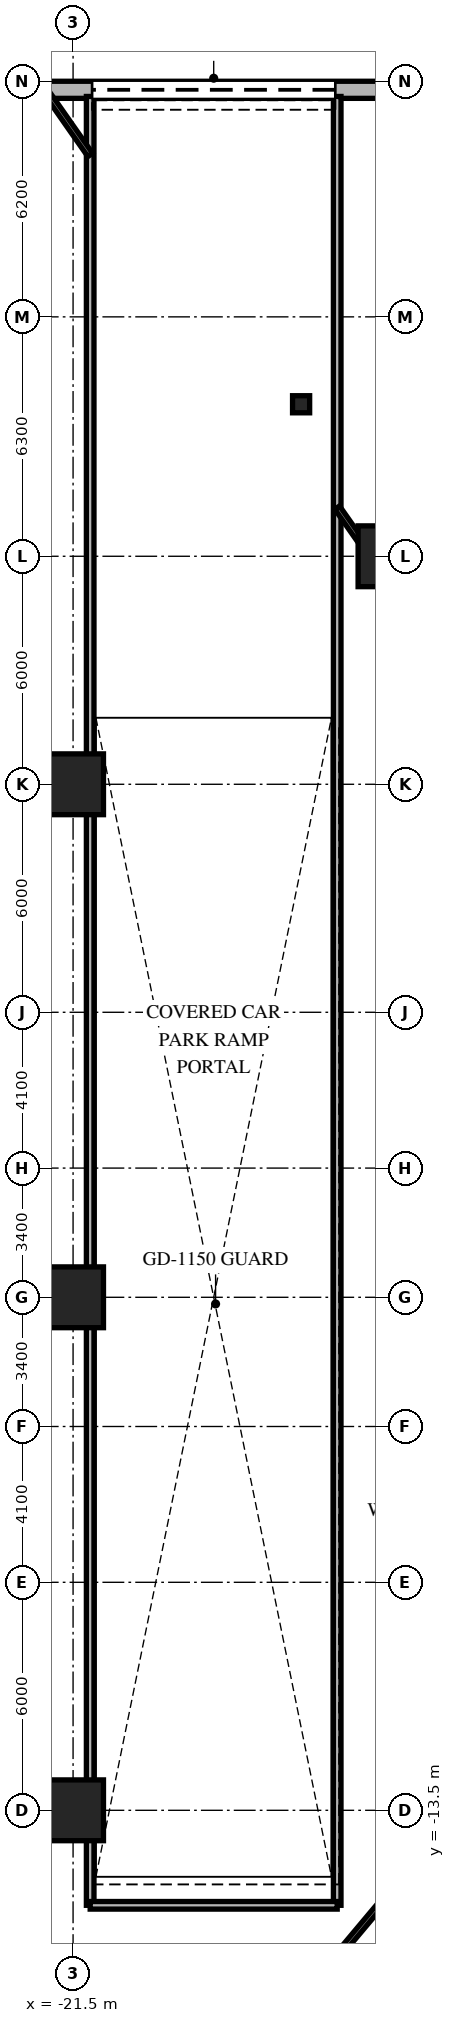
"""IFC4 building model, lengths in metres.
Left out: names, types, materials, properties, quantities, classifications, styles, units other than length and angle.
Written with IfcOpenShell. Run it as: python <this file> out.ifc"""

import sys

from ifc_helpers import new_model, si_unit, direction, frame, frame_2d, origin, origin_2d, place, context, subcontext, project, spatial, rectangle, extrude, element, fill, save


model = new_model("IFC4")
c1 = context("Model", 3, precision=1e-05, world=origin(), true_north=direction((0.0, 1.0)))
c2 = subcontext(c1, "Body", "Model", "MODEL_VIEW")
j1 = project(units=[si_unit("LENGTHUNIT", "METRE"), si_unit("PLANEANGLEUNIT", "RADIAN")], contexts=[c1])
p1 = place(None, origin())
s1 = spatial("IfcSite", under=j1, at=p1, CompositionType="ELEMENT")
p2 = place(p1, origin())
s2 = spatial("IfcBuilding", under=s1, at=p2, CompositionType="ELEMENT")
p3 = place(p2, origin())
s3 = spatial("IfcBuildingStorey", under=s2, at=p3, CompositionType="ELEMENT", Elevation=0.0)
for number, where, z_axis, x_axis in (
    (1, (-21.5, -13.5, 0.0), (0.0, 0.0, 1.0), (1.0, 0.0, 0.0)),
    (2, (-21.5, 0.0, 0.0), (0.0, 0.0, 1.0), (1.0, 0.0, 0.0)),
    (3, (-21.5, 13.5, 0.0), (0.0, 0.0, 1.0), (1.0, 0.0, 0.0)),
    (4, (-13.2, 19.5, 0.0), (0.0, 0.0, 1.0), (1.0, 0.0, 0.0)),
):
    element("IfcColumn", number, at=place(p3, frame(where, z_axis=z_axis, x_axis=x_axis)), inside=s3, PredefinedType="COLUMN", context=c2, shape_type="SweptSolid", body=[
        extrude(rectangle(XDim=1.6, YDim=1.6, at=origin_2d()), origin(), (0.0, 0.0, 1.0), 6.0),
    ])
p4 = place(p3, frame((-15.5, 23.5, 0.0), z_axis=(0.0, 0.0, 1.0), x_axis=(1.0, 0.0, 0.0)))
e5 = element("IfcColumn", 5, at=p4, inside=s3, PredefinedType="PILASTER", context=c2, shape_type="SweptSolid", body=[
    extrude(rectangle(XDim=0.45, YDim=0.45, at=origin_2d()), origin(), (0.0, 0.0, 1.0), 6.0),
])
p5 = place(p3, frame((19.782, 31.775, 0.0), z_axis=(0.0, 0.0, 1.0), x_axis=(-1.0, 0.0, 0.0)))
e6 = element("IfcWall", 6, at=p5, inside=s3, PredefinedType="SOLIDWALL", context=c2, shape_type="SweptSolid", body=[
    extrude(rectangle(XDim=42.295, YDim=0.45, at=frame_2d((21.148, 0.0))), origin(), (0.0, 0.0, 1.0), 4.65),
])
p6 = place(p5, frame((34.382, 0.0, 0.0)))
e7 = element("IfcOpeningElement", 7, at=p6, cuts=e6, PredefinedType="OPENING", context=c2, shape_type="SweptSolid", body=[
    extrude(rectangle(XDim=6.4, YDim=3.2, at=frame_2d((3.2, 1.6))), frame((0.0, 0.235, 0.0), z_axis=(0.0, -1.0, 0.0), x_axis=(1.0, 0.0, 0.0)), (0.0, 0.0, 1.0), 0.47),
])
p7 = place(p5, frame((2.383, 0.0, 0.0)))
e8 = element("IfcOpeningElement", 8, at=p7, cuts=e6, PredefinedType="OPENING", context=c2, shape_type="SweptSolid", body=[
    extrude(rectangle(XDim=2.0, YDim=2.4, at=frame_2d((1.0, 1.2))), frame((0.0, 0.235, 0.0), z_axis=(0.0, -1.0, 0.0), x_axis=(1.0, 0.0, 0.0)), (0.0, 0.0, 1.0), 0.47),
])
p8 = place(p5, frame((5.782, 0.0, 0.0)))
e9 = element("IfcOpeningElement", 9, at=p8, cuts=e6, PredefinedType="OPENING", context=c2, shape_type="SweptSolid", body=[
    extrude(rectangle(XDim=2.0, YDim=2.4, at=frame_2d((1.0, 1.2))), frame((0.0, 0.235, 0.0), z_axis=(0.0, -1.0, 0.0), x_axis=(1.0, 0.0, 0.0)), (0.0, 0.0, 1.0), 0.47),
])
p9 = place(p5, frame((9.182, 0.0, 0.0)))
e10 = element("IfcOpeningElement", 10, at=p9, cuts=e6, PredefinedType="OPENING", context=c2, shape_type="SweptSolid", body=[
    extrude(rectangle(XDim=2.0, YDim=2.4, at=frame_2d((1.0, 1.2))), frame((0.0, 0.235, 0.0), z_axis=(0.0, -1.0, 0.0), x_axis=(1.0, 0.0, 0.0)), (0.0, 0.0, 1.0), 0.47),
])
p10 = place(p5, frame((12.582, 0.0, 0.0)))
e11 = element("IfcOpeningElement", 11, at=p10, cuts=e6, PredefinedType="OPENING", context=c2, shape_type="SweptSolid", body=[
    extrude(rectangle(XDim=2.0, YDim=2.4, at=frame_2d((1.0, 1.2))), frame((0.0, 0.235, 0.0), z_axis=(0.0, -1.0, 0.0), x_axis=(1.0, 0.0, 0.0)), (0.0, 0.0, 1.0), 0.47),
])
p11 = place(p5, frame((15.982, 0.0, 0.0)))
e12 = element("IfcOpeningElement", 12, at=p11, cuts=e6, PredefinedType="OPENING", context=c2, shape_type="SweptSolid", body=[
    extrude(rectangle(XDim=2.0, YDim=2.4, at=frame_2d((1.0, 1.2))), frame((0.0, 0.235, 0.0), z_axis=(0.0, -1.0, 0.0), x_axis=(1.0, 0.0, 0.0)), (0.0, 0.0, 1.0), 0.47),
])
p12 = place(p5, frame((19.582, 0.0, 0.0)))
e13 = element("IfcOpeningElement", 13, at=p12, cuts=e6, PredefinedType="OPENING", context=c2, shape_type="SweptSolid", body=[
    extrude(rectangle(XDim=2.0, YDim=2.4, at=frame_2d((1.0, 1.2))), frame((0.0, 0.235, 0.0), z_axis=(0.0, -1.0, 0.0), x_axis=(1.0, 0.0, 0.0)), (0.0, 0.0, 1.0), 0.47),
])
p13 = place(p5, frame((23.182, 0.0, 0.0)))
e14 = element("IfcOpeningElement", 14, at=p13, cuts=e6, PredefinedType="OPENING", context=c2, shape_type="SweptSolid", body=[
    extrude(rectangle(XDim=2.0, YDim=2.4, at=frame_2d((1.0, 1.2))), frame((0.0, 0.235, 0.0), z_axis=(0.0, -1.0, 0.0), x_axis=(1.0, 0.0, 0.0)), (0.0, 0.0, 1.0), 0.47),
])
p14 = place(p5, frame((26.982, 0.0, 0.0)))
e15 = element("IfcOpeningElement", 15, at=p14, cuts=e6, PredefinedType="OPENING", context=c2, shape_type="SweptSolid", body=[
    extrude(rectangle(XDim=2.0, YDim=2.4, at=frame_2d((1.0, 1.2))), frame((0.0, 0.235, 0.0), z_axis=(0.0, -1.0, 0.0), x_axis=(1.0, 0.0, 0.0)), (0.0, 0.0, 1.0), 0.47),
])
p15 = place(p5, frame((30.582, 0.0, 0.0)))
e16 = element("IfcOpeningElement", 16, at=p15, cuts=e6, PredefinedType="OPENING", context=c2, shape_type="SweptSolid", body=[
    extrude(rectangle(XDim=2.0, YDim=2.4, at=frame_2d((1.0, 1.2))), frame((0.0, 0.235, 0.0), z_axis=(0.0, -1.0, 0.0), x_axis=(1.0, 0.0, 0.0)), (0.0, 0.0, 1.0), 0.47),
])
for number, where, z_axis, x_axis in (
    (17, (-21.05, -16.0, 0.0), (0.0, 0.0, 1.0), (0.0, 1.0, 0.0)),
    (18, (-14.55, -16.0, 0.0), (0.0, 0.0, 1.0), (0.0, 1.0, 0.0)),
):
    element("IfcWall", number, at=place(p3, frame(where, z_axis=z_axis, x_axis=x_axis)), inside=s3, PredefinedType="PARTITIONING", context=c2, shape_type="SweptSolid", body=[
        extrude(rectangle(XDim=47.6, YDim=0.2, at=frame_2d((23.8, 0.0))), origin(), (0.0, 0.0, 1.0), 4.67),
    ])
p16 = place(p3, frame((-21.05, -16.0, 0.0), z_axis=(0.0, 0.0, 1.0), x_axis=(1.0, 0.0, 0.0)))
e19 = element("IfcWall", 19, at=p16, inside=s3, PredefinedType="PARTITIONING", context=c2, shape_type="SweptSolid", body=[
    extrude(rectangle(XDim=6.5, YDim=0.2, at=frame_2d((3.25, 0.0))), origin(), (0.0, 0.0, 1.0), 4.814),
])
p17 = place(p3, frame((-8.265, -9.85, 0.0), z_axis=(0.0, 0.0, 1.0), x_axis=(-0.642790692764, -0.766041856099, 0.0)))
e20 = element("IfcWall", 20, at=p17, inside=s3, PredefinedType="PARTITIONING", context=c2, shape_type="SweptSolid", body=[
    extrude(rectangle(XDim=23.784, YDim=0.15, at=frame_2d((11.892, 0.0))), origin(), (0.0, 0.0, 1.0), 4.67),
])
p18 = place(p3, frame((-6.897, 9.85, 0.0), z_axis=(0.0, 0.0, 1.0), x_axis=(-0.57358637099, 0.81914508789, 0.0)))
e21 = element("IfcWall", 21, at=p18, inside=s3, PredefinedType="PARTITIONING", context=c2, shape_type="SweptSolid", body=[
    extrude(rectangle(XDim=13.343, YDim=0.15, at=frame_2d((6.671, 0.0))), origin(), (0.0, 0.0, 1.0), 4.67),
])
p19 = place(p3, frame((-21.05, 30.062, 0.0), z_axis=(0.0, 0.0, 1.0), x_axis=(-0.57355639976, 0.819166073696, 0.0)))
e22 = element("IfcWall", 22, at=p19, inside=s3, PredefinedType="PARTITIONING", context=c2, shape_type="SweptSolid", body=[
    extrude(rectangle(XDim=2.09, YDim=0.15, at=frame_2d((1.045, 0.0))), origin(), (0.0, 0.0, 1.0), 5.68),
])
p20 = place(p6, origin())
e23 = element("IfcDoor", 23, at=p20, inside=s3, OperationType="ROLLINGUP", PredefinedType="GATE", context=c2, shape_type="SweptSolid", body=[
    extrude(rectangle(XDim=6.4, YDim=3.2, at=frame_2d((3.2, 1.6))), frame((0.0, 0.025, 0.0), z_axis=(0.0, -1.0, 0.0), x_axis=(1.0, 0.0, 0.0)), (0.0, 0.0, 1.0), 0.05),
])
fill(e7, e23)
save(model, sys.argv[1])
